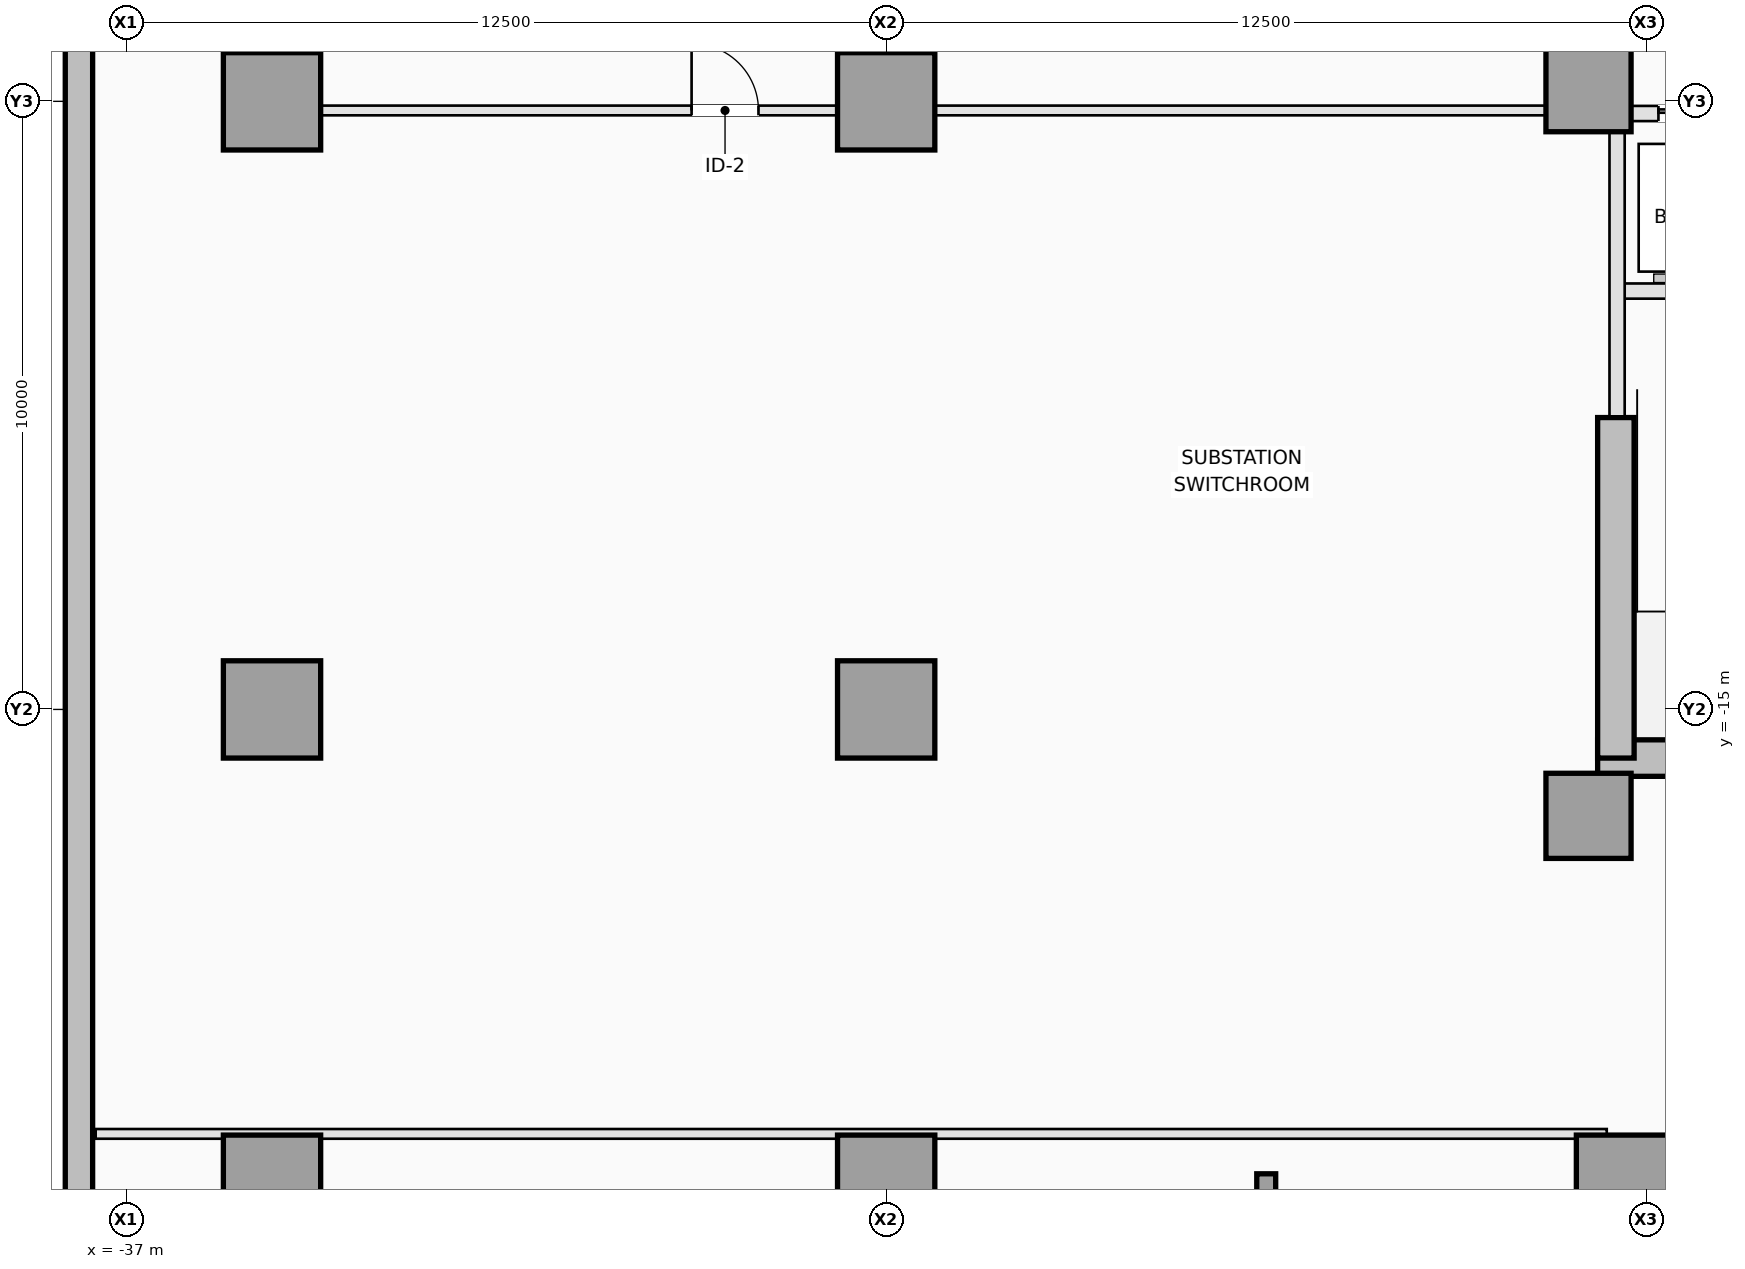
"""IFC4 building model, lengths in metres.
Left out: names, types, materials, properties, quantities, classifications, styles, units other than length and angle.
Written with IfcOpenShell. Run it as: python <this file> out.ifc"""

import sys

from ifc_helpers import new_model, si_unit, direction, frame, frame_2d, origin, origin_2d, place, context, subcontext, project, spatial, rectangle, i_section, extrude, element, fill, save


model = new_model("IFC4")
c1 = context("Model", 3, precision=1e-05, world=origin(), true_north=direction((0.0, 1.0)))
c2 = subcontext(c1, "Body", "Model", "MODEL_VIEW")
j1 = project(units=[si_unit("LENGTHUNIT", "METRE"), si_unit("PLANEANGLEUNIT", "RADIAN")], contexts=[c1])
p1 = place(None, origin())
s1 = spatial("IfcSite", under=j1, at=p1, CompositionType="ELEMENT")
p2 = place(p1, origin())
s2 = spatial("IfcBuilding", under=s1, at=p2, CompositionType="ELEMENT")
p3 = place(p2, frame((0.0, 0.0, -10.0)))
s3 = spatial("IfcBuildingStorey", under=s2, at=p3, CompositionType="ELEMENT", Elevation=-10.0)
p4 = place(p3, frame((-37.775, -25.832, 0.0), z_axis=(0.0, 0.0, 1.0), x_axis=(0.0, 1.0, 0.0)))
e1 = element("IfcWall", 1, at=p4, inside=s3, PredefinedType="USERDEFINED", context=c2, shape_type="SweptSolid", body=[
    extrude(rectangle(XDim=51.438, YDim=0.45, at=frame_2d((25.719, 0.0))), origin(), (0.0, 0.0, 1.0), 5.0),
])
p5 = place(p3, frame((-12.8, -15.8, 0.0), z_axis=(0.0, 0.0, 1.0), x_axis=(1.0, 0.0, 0.0)))
e2 = element("IfcWall", 2, at=p5, inside=s3, PredefinedType="SHEAR", context=c2, shape_type="SweptSolid", body=[
    extrude(rectangle(XDim=4.2, YDim=0.6, at=frame_2d((2.1, 0.0))), origin(), (0.0, 0.0, 1.0), 5.0),
])
p6 = place(p3, frame((-12.5, -15.8, 0.0), z_axis=(0.0, 0.0, 1.0), x_axis=(0.0, 1.0, 0.0)))
e3 = element("IfcWall", 3, at=p6, inside=s3, PredefinedType="SHEAR", context=c2, shape_type="SweptSolid", body=[
    extrude(rectangle(XDim=5.6, YDim=0.6, at=frame_2d((2.8, 0.0))), origin(), (0.0, 0.0, 1.0), 5.0),
])
for number, where, z_axis, x_axis in (
    (4, (-12.95, -16.75, -0.45), (0.0, 0.0, 1.0), (1.0, 0.0, 0.0)),
    (5, (-12.95, -4.8, -0.45), (0.0, 0.0, 1.0), (1.0, 0.0, 0.0)),
):
    element("IfcColumn", number, at=place(p3, frame(where, z_axis=z_axis, x_axis=x_axis)), inside=s3, PredefinedType="COLUMN", context=c2, shape_type="SweptSolid", body=[
        extrude(rectangle(XDim=1.4, YDim=1.4, at=origin_2d()), origin(), (0.0, 0.0, 1.0), 5.45),
    ])
for number, where, z_axis, x_axis in (
    (6, (-34.6, -22.8, -0.45), (0.0, 0.0, 1.0), (1.0, 0.0, 0.0)),
    (7, (-24.5, -22.8, -0.45), (0.0, 0.0, 1.0), (1.0, 0.0, 0.0)),
    (8, (-12.35, -22.8, -0.45), (0.0, 0.0, 1.0), (1.0, 0.0, 0.0)),
    (9, (-34.6, -15.0, -0.45), (0.0, 0.0, 1.0), (1.0, 0.0, 0.0)),
    (10, (-24.5, -15.0, -0.45), (0.0, 0.0, 1.0), (1.0, 0.0, 0.0)),
    (11, (-34.6, -5.0, -0.45), (0.0, 0.0, 1.0), (1.0, 0.0, 0.0)),
    (12, (-24.5, -5.0, -0.45), (0.0, 0.0, 1.0), (1.0, 0.0, 0.0)),
):
    element("IfcColumn", number, at=place(p3, frame(where, z_axis=z_axis, x_axis=x_axis)), inside=s3, PredefinedType="COLUMN", context=c2, shape_type="SweptSolid", body=[
        extrude(rectangle(XDim=1.6, YDim=1.6, at=origin_2d()), origin(), (0.0, 0.0, 1.0), 5.45),
    ])
p7 = place(p3, frame((-18.25, -22.8, -0.45), z_axis=(0.0, 0.0, 1.0), x_axis=(1.0, 0.0, 0.0)))
e13 = element("IfcColumn", 13, at=p7, inside=s3, PredefinedType="COLUMN", context=c2, shape_type="SweptSolid", body=[
    extrude(i_section(OverallWidth=0.311, OverallDepth=0.327, WebThickness=0.016, FlangeThickness=0.025, FilletRadius=0.017, at=origin_2d()), origin(), (0.0, 0.0, 1.0), 5.45),
])
p8 = place(p3, frame((-12.38, -8.12, 0.0), z_axis=(0.0, 0.0, 1.0), x_axis=(1.0, 0.0, 0.0)))
e14 = element("IfcWall", 14, at=p8, inside=s3, PredefinedType="PARTITIONING", context=c2, shape_type="SweptSolid", body=[
    extrude(rectangle(XDim=3.22, YDim=0.25, at=frame_2d((1.61, 0.0))), origin(), (0.0, 0.0, 1.0), 4.68),
])
p9 = place(p3, frame((-12.48, -10.18, 0.0), z_axis=(0.0, 0.0, 1.0), x_axis=(0.0, 1.0, 0.0)))
e15 = element("IfcWall", 15, at=p9, inside=s3, PredefinedType="PARTITIONING", context=c2, shape_type="SweptSolid", body=[
    extrude(rectangle(XDim=4.678, YDim=0.25, at=frame_2d((2.339, 0.0))), origin(), (0.0, 0.0, 1.0), 4.68),
])
p10 = place(p3, frame((-12.248, -5.2, 0.0), z_axis=(0.0, 0.0, 1.0), x_axis=(1.0, 0.0, 0.0)))
e16 = element("IfcWall", 16, at=p10, inside=s3, PredefinedType="PARTITIONING", context=c2, shape_type="SweptSolid", body=[
    extrude(rectangle(XDim=7.796, YDim=0.25, at=frame_2d((3.898, 0.0))), origin(), (0.0, 0.0, 1.0), 4.68),
])
p11 = place(p10, frame((0.448, 0.0, 0.0)))
e17 = element("IfcOpeningElement", 17, at=p11, cuts=e16, PredefinedType="OPENING", context=c2, shape_type="SweptSolid", body=[
    extrude(rectangle(XDim=1.0, YDim=2.15, at=frame_2d((0.5, 1.075))), frame((0.0, 0.135, 0.0), z_axis=(0.0, -1.0, 0.0), x_axis=(1.0, 0.0, 0.0)), (0.0, 0.0, 1.0), 0.27),
])
p12 = place(p10, frame((2.398, 0.0, 0.0)))
e18 = element("IfcOpeningElement", 18, at=p12, cuts=e16, PredefinedType="OPENING", context=c2, shape_type="SweptSolid", body=[
    extrude(rectangle(XDim=1.0, YDim=2.15, at=frame_2d((0.5, 1.075))), frame((0.0, 0.135, 0.0), z_axis=(0.0, -1.0, 0.0), x_axis=(1.0, 0.0, 0.0)), (0.0, 0.0, 1.0), 0.27),
])
p13 = place(p10, frame((4.348, 0.0, 0.0)))
e19 = element("IfcOpeningElement", 19, at=p13, cuts=e16, PredefinedType="OPENING", context=c2, shape_type="SweptSolid", body=[
    extrude(rectangle(XDim=1.0, YDim=2.15, at=frame_2d((0.5, 1.075))), frame((0.0, 0.135, 0.0), z_axis=(0.0, -1.0, 0.0), x_axis=(1.0, 0.0, 0.0)), (0.0, 0.0, 1.0), 0.27),
])
p14 = place(p10, frame((6.298, 0.0, 0.0)))
e20 = element("IfcOpeningElement", 20, at=p14, cuts=e16, PredefinedType="OPENING", context=c2, shape_type="SweptSolid", body=[
    extrude(rectangle(XDim=1.0, YDim=2.15, at=frame_2d((0.5, 1.075))), frame((0.0, 0.135, 0.0), z_axis=(0.0, -1.0, 0.0), x_axis=(1.0, 0.0, 0.0)), (0.0, 0.0, 1.0), 0.27),
])
p15 = place(p3, frame((-37.5, -21.98, 0.0), z_axis=(0.0, 0.0, 1.0), x_axis=(1.0, 0.0, 0.0)))
e21 = element("IfcWall", 21, at=p15, inside=s3, PredefinedType="PARTITIONING", context=c2, shape_type="SweptSolid", body=[
    extrude(rectangle(XDim=24.85, YDim=0.16, at=frame_2d((12.425, 0.0))), origin(), (0.0, 0.0, 1.0), 4.68),
])
p16 = place(p3, frame((-33.798, -5.15, 0.0), z_axis=(0.0, 0.0, 1.0), x_axis=(1.0, 0.0, 0.0)))
e22 = element("IfcWall", 22, at=p16, inside=s3, PredefinedType="PARTITIONING", context=c2, shape_type="SweptSolid", body=[
    extrude(rectangle(XDim=8.496, YDim=0.16, at=frame_2d((4.248, 0.0))), origin(), (0.0, 0.0, 1.0), 3.656),
])
p17 = place(p16, frame((6.098, 0.0, 0.0)))
e23 = element("IfcOpeningElement", 23, at=p17, cuts=e22, PredefinedType="OPENING", context=c2, shape_type="SweptSolid", body=[
    extrude(rectangle(XDim=1.1, YDim=2.15, at=frame_2d((0.55, 1.075))), frame((0.0, 0.09, 0.0), z_axis=(0.0, -1.0, 0.0), x_axis=(1.0, 0.0, 0.0)), (0.0, 0.0, 1.0), 0.18),
])
p18 = place(p3, frame((-23.698, -5.15, 0.0), z_axis=(0.0, 0.0, 1.0), x_axis=(1.0, 0.0, 0.0)))
e24 = element("IfcWall", 24, at=p18, inside=s3, PredefinedType="PARTITIONING", context=c2, shape_type="SweptSolid", body=[
    extrude(rectangle(XDim=10.046, YDim=0.16, at=frame_2d((5.023, 0.0))), origin(), (0.0, 0.0, 1.0), 3.656),
])
p19 = place(p11, origin())
e25 = element("IfcDoor", 25, at=p19, inside=s3, OperationType="SLIDING_TO_LEFT", PredefinedType="DOOR", context=c2, shape_type="SweptSolid", body=[
    extrude(rectangle(XDim=1.0, YDim=2.15, at=frame_2d((0.5, 1.075))), frame((0.0, 0.025, 0.0), z_axis=(0.0, -1.0, 0.0), x_axis=(1.0, 0.0, 0.0)), (0.0, 0.0, 1.0), 0.05),
])
fill(e17, e25)
p20 = place(p17, origin())
e26 = element("IfcDoor", 26, at=p20, inside=s3, OperationType="SINGLE_SWING_LEFT", PredefinedType="DOOR", context=c2, shape_type="SweptSolid", body=[
    extrude(rectangle(XDim=1.1, YDim=2.15, at=frame_2d((0.55, 1.075))), frame((0.0, 0.025, 0.0), z_axis=(0.0, -1.0, 0.0), x_axis=(1.0, 0.0, 0.0)), (0.0, 0.0, 1.0), 0.05),
])
fill(e23, e26)
save(model, sys.argv[1])
